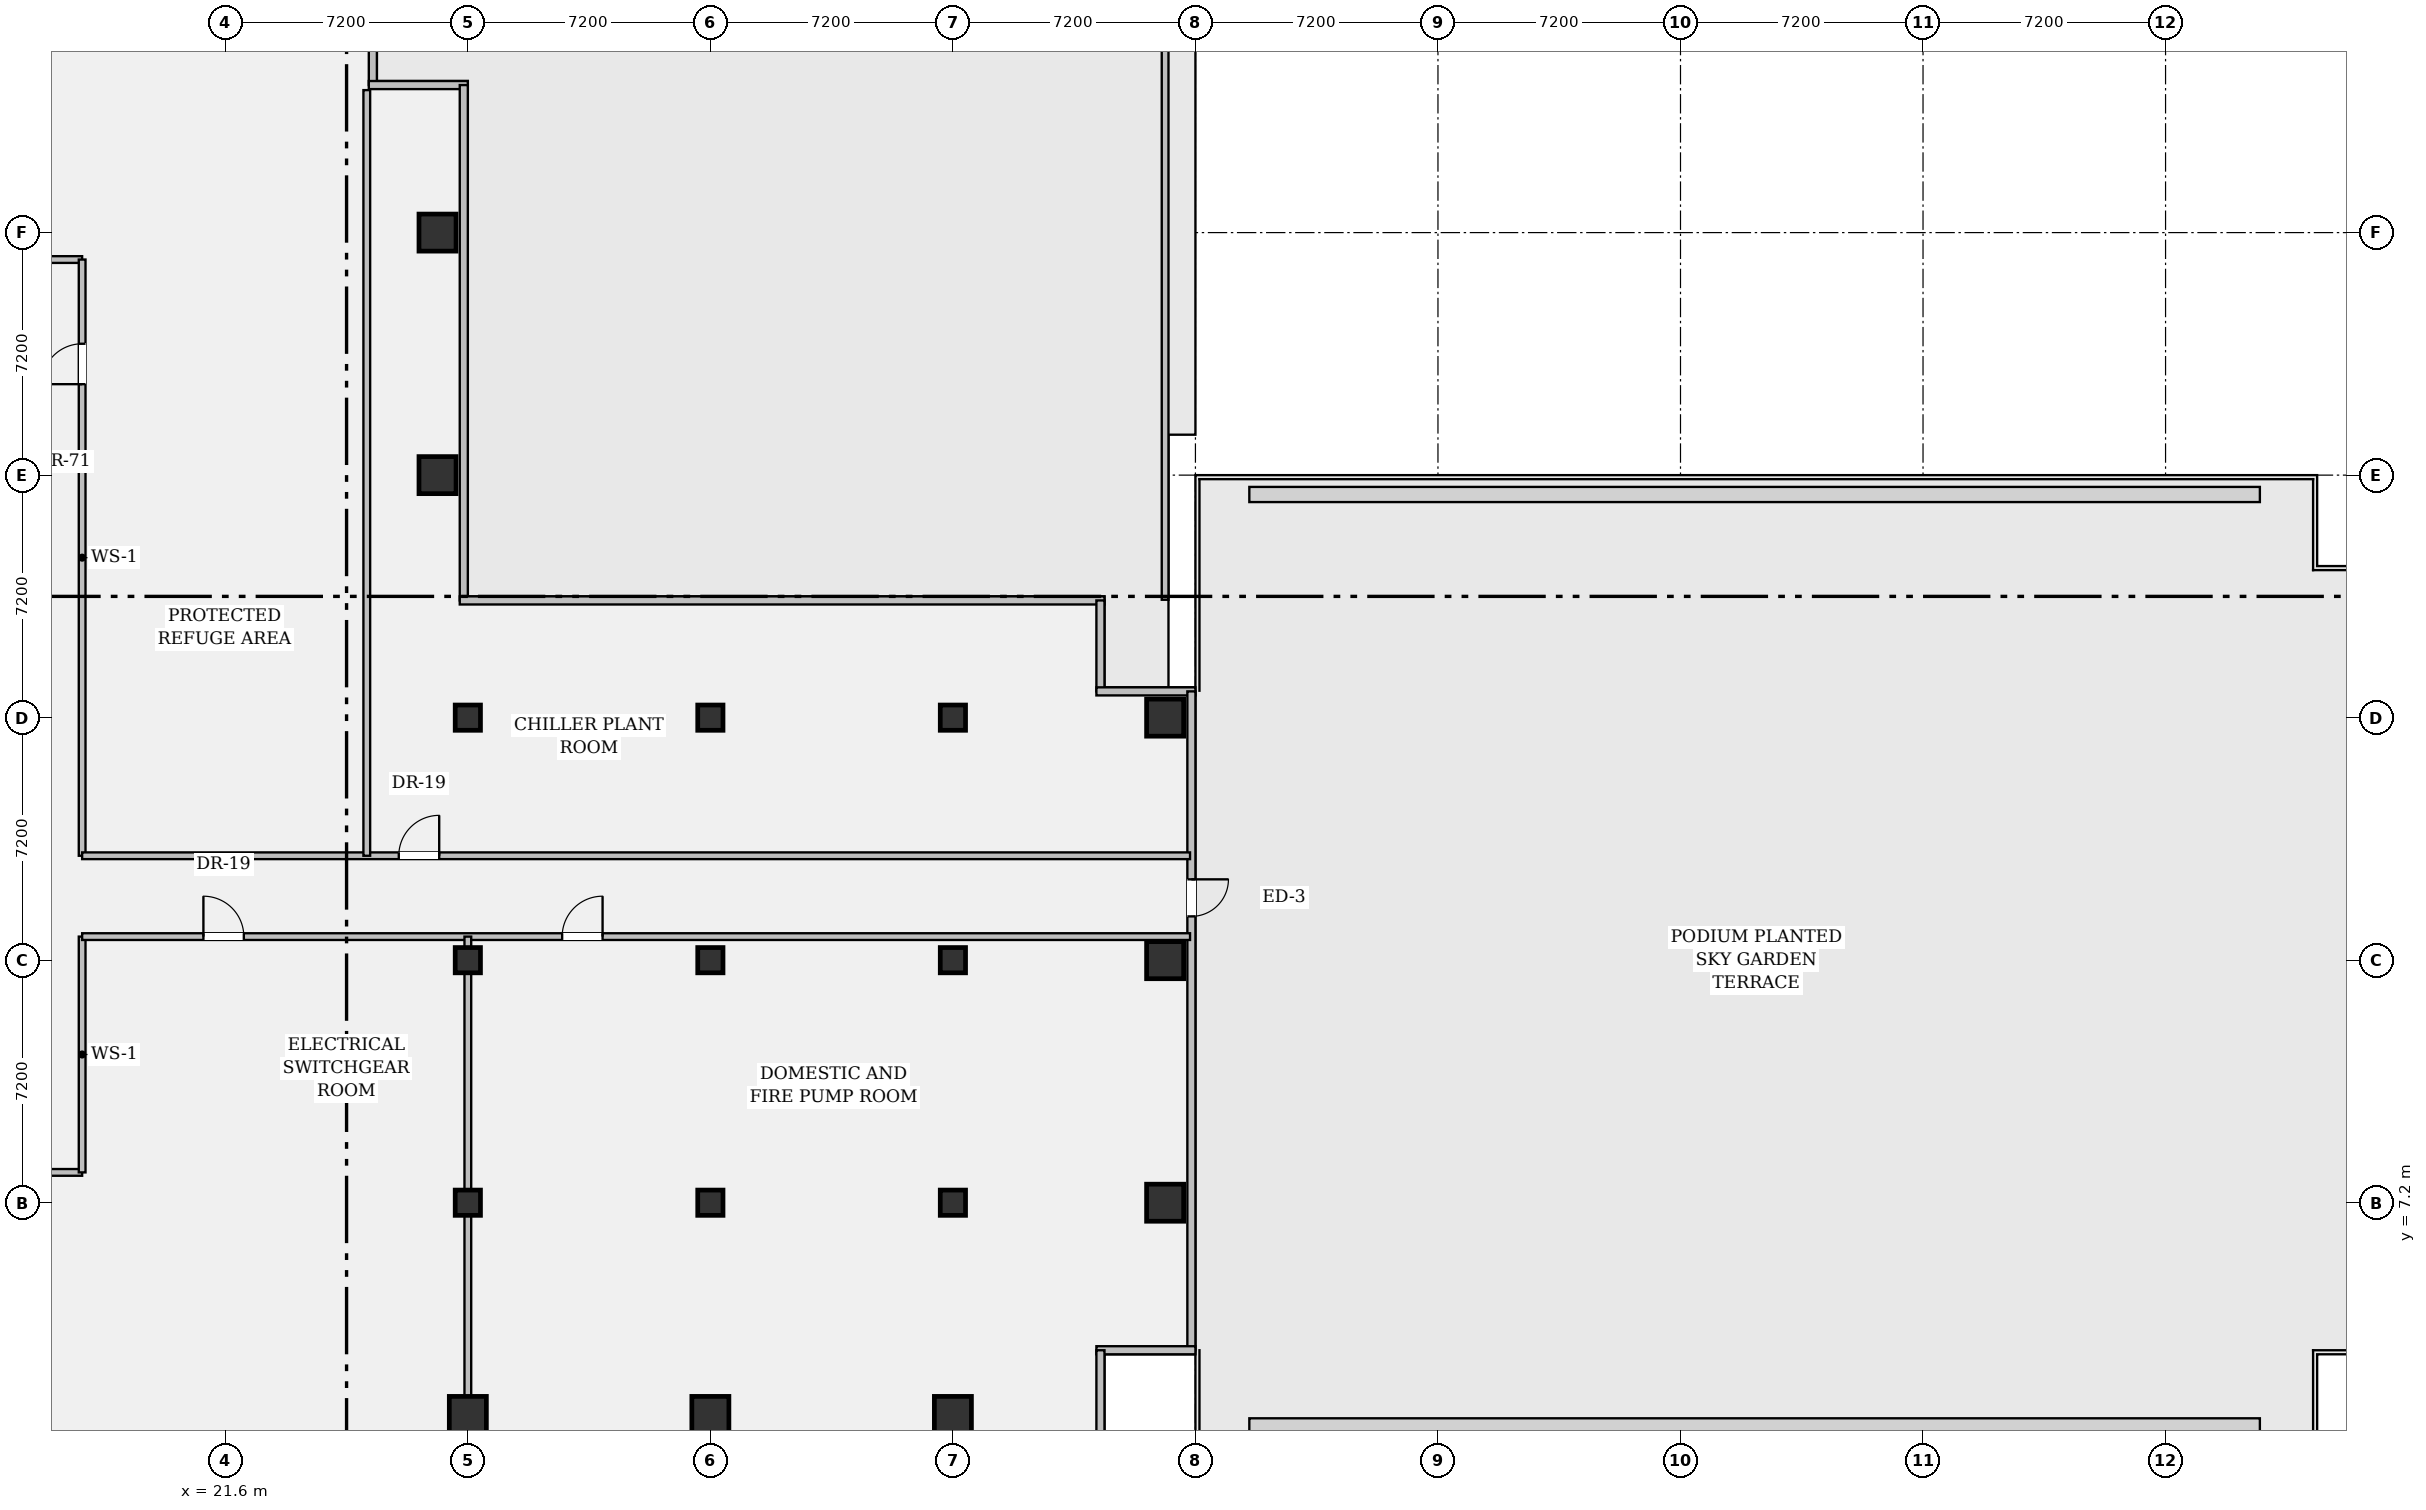
"""IFC4 building model, lengths in metres.
Left out: names, types, materials, properties, quantities, classifications, styles, units other than length and angle.
Written with IfcOpenShell. Run it as: python <this file> out.ifc"""

import sys

from ifc_helpers import new_model, si_unit, direction, frame, frame_2d, origin, origin_2d, place, context, subcontext, project, spatial, rectangle, hollow_rectangle, extrude, element, fill, save


model = new_model("IFC4")
c1 = context("Model", 3, precision=1e-05, world=origin(), true_north=direction((0.0, 1.0)))
c2 = subcontext(c1, "Body", "Model", "MODEL_VIEW")
j1 = project(units=[si_unit("LENGTHUNIT", "METRE"), si_unit("PLANEANGLEUNIT", "RADIAN")], contexts=[c1])
p1 = place(None, origin())
s1 = spatial("IfcSite", under=j1, at=p1, CompositionType="ELEMENT")
p2 = place(p1, origin())
s2 = spatial("IfcBuilding", under=s1, at=p2, CompositionType="ELEMENT")
p3 = place(p2, frame((0.0, 0.0, 26.25)))
s3 = spatial("IfcBuildingStorey", under=s2, at=p3, CompositionType="ELEMENT", Elevation=26.25)
for number, where, z_axis, x_axis in (
    (1, (27.9, 28.8, 0.0), (0.0, 0.0, 1.0), (1.0, 0.0, 0.0)),
    (2, (27.9, 36.0, 0.0), (0.0, 0.0, 1.0), (1.0, 0.0, 0.0)),
    (3, (28.8, 0.9, 0.0), (0.0, 0.0, 1.0), (1.0, 0.0, 0.0)),
):
    element("IfcColumn", number, at=place(p3, frame(where, z_axis=z_axis, x_axis=x_axis)), inside=s3, PredefinedType="COLUMN", context=c2, shape_type="SweptSolid", body=[
        extrude(hollow_rectangle(XDim=1.1, YDim=1.1, WallThickness=0.07, at=origin_2d()), origin(), (0.0, 0.0, 1.0), 4.62),
    ])
for number, where, z_axis, x_axis in (
    (4, (28.8, 7.2, 0.0), (0.0, 0.0, 1.0), (1.0, 0.0, 0.0)),
    (5, (28.8, 14.4, 0.0), (0.0, 0.0, 1.0), (1.0, 0.0, 0.0)),
    (6, (28.8, 21.6, 0.0), (0.0, 0.0, 1.0), (1.0, 0.0, 0.0)),
):
    element("IfcColumn", number, at=place(p3, frame(where, z_axis=z_axis, x_axis=x_axis)), inside=s3, PredefinedType="COLUMN", context=c2, shape_type="SweptSolid", body=[
        extrude(rectangle(XDim=0.75, YDim=0.75, at=origin_2d()), origin(), (0.0, 0.0, 1.0), 4.62),
    ])
p4 = place(p3, frame((36.0, 0.9, 0.0), z_axis=(0.0, 0.0, 1.0), x_axis=(1.0, 0.0, 0.0)))
e7 = element("IfcColumn", 7, at=p4, inside=s3, PredefinedType="COLUMN", context=c2, shape_type="SweptSolid", body=[
    extrude(hollow_rectangle(XDim=1.1, YDim=1.1, WallThickness=0.07, at=origin_2d()), origin(), (0.0, 0.0, 1.0), 4.62),
])
for number, where, z_axis, x_axis in (
    (8, (36.0, 7.2, 0.0), (0.0, 0.0, 1.0), (1.0, 0.0, 0.0)),
    (9, (36.0, 14.4, 0.0), (0.0, 0.0, 1.0), (1.0, 0.0, 0.0)),
    (10, (36.0, 21.6, 0.0), (0.0, 0.0, 1.0), (1.0, 0.0, 0.0)),
):
    element("IfcColumn", number, at=place(p3, frame(where, z_axis=z_axis, x_axis=x_axis)), inside=s3, PredefinedType="COLUMN", context=c2, shape_type="SweptSolid", body=[
        extrude(rectangle(XDim=0.75, YDim=0.75, at=origin_2d()), origin(), (0.0, 0.0, 1.0), 4.62),
    ])
p5 = place(p3, frame((43.2, 0.9, 0.0), z_axis=(0.0, 0.0, 1.0), x_axis=(1.0, 0.0, 0.0)))
e11 = element("IfcColumn", 11, at=p5, inside=s3, PredefinedType="COLUMN", context=c2, shape_type="SweptSolid", body=[
    extrude(hollow_rectangle(XDim=1.1, YDim=1.1, WallThickness=0.07, at=origin_2d()), origin(), (0.0, 0.0, 1.0), 4.62),
])
for number, where, z_axis, x_axis in (
    (12, (43.2, 7.2, 0.0), (0.0, 0.0, 1.0), (1.0, 0.0, 0.0)),
    (13, (43.2, 14.4, 0.0), (0.0, 0.0, 1.0), (1.0, 0.0, 0.0)),
    (14, (43.2, 21.6, 0.0), (0.0, 0.0, 1.0), (1.0, 0.0, 0.0)),
):
    element("IfcColumn", number, at=place(p3, frame(where, z_axis=z_axis, x_axis=x_axis)), inside=s3, PredefinedType="COLUMN", context=c2, shape_type="SweptSolid", body=[
        extrude(rectangle(XDim=0.75, YDim=0.75, at=origin_2d()), origin(), (0.0, 0.0, 1.0), 4.62),
    ])
for number, where, z_axis, x_axis in (
    (15, (49.5, 7.2, 0.0), (0.0, 0.0, 1.0), (1.0, 0.0, 0.0)),
    (16, (49.5, 14.4, 0.0), (0.0, 0.0, 1.0), (1.0, 0.0, 0.0)),
    (17, (49.5, 21.6, 0.0), (0.0, 0.0, 1.0), (1.0, 0.0, 0.0)),
):
    element("IfcColumn", number, at=place(p3, frame(where, z_axis=z_axis, x_axis=x_axis)), inside=s3, PredefinedType="COLUMN", context=c2, shape_type="SweptSolid", body=[
        extrude(hollow_rectangle(XDim=1.1, YDim=1.1, WallThickness=0.07, at=origin_2d()), origin(), (0.0, 0.0, 1.0), 4.62),
    ])
p6 = place(p3, frame((25.98, 43.08, 0.0), z_axis=(0.0, 0.0, 1.0), x_axis=(0.0, -1.0, 0.0)))
e18 = element("IfcWall", 18, at=p6, inside=s3, PredefinedType="STANDARD", context=c2, shape_type="SweptSolid", body=[
    extrude(rectangle(XDim=2.7, YDim=0.24, at=frame_2d((1.35, 0.0))), origin(), (0.0, 0.0, 1.0), 4.62),
])
p7 = place(p3, frame((25.86, 40.38, 0.0), z_axis=(0.0, 0.0, 1.0), x_axis=(1.0, 0.0, 0.0)))
e19 = element("IfcWall", 19, at=p7, inside=s3, PredefinedType="STANDARD", context=c2, shape_type="SweptSolid", body=[
    extrude(rectangle(XDim=2.94, YDim=0.24, at=frame_2d((1.47, 0.0))), origin(), (0.0, 0.0, 1.0), 4.62),
])
p8 = place(p3, frame((28.68, 40.38, 0.0), z_axis=(0.0, 0.0, 1.0), x_axis=(0.0, -1.0, 0.0)))
e20 = element("IfcWall", 20, at=p8, inside=s3, PredefinedType="STANDARD", context=c2, shape_type="SweptSolid", body=[
    extrude(rectangle(XDim=15.3, YDim=0.24, at=frame_2d((7.65, 0.0))), origin(), (0.0, 0.0, 1.0), 4.62),
])
p9 = place(p3, frame((28.56, 25.08, 0.0), z_axis=(0.0, 0.0, 1.0), x_axis=(1.0, 0.0, 0.0)))
e21 = element("IfcWall", 21, at=p9, inside=s3, PredefinedType="STANDARD", context=c2, shape_type="SweptSolid", body=[
    extrude(rectangle(XDim=19.14, YDim=0.24, at=frame_2d((9.57, 0.0))), origin(), (0.0, 0.0, 1.0), 4.62),
])
p10 = place(p3, frame((47.58, 25.08, 0.0), z_axis=(0.0, 0.0, 1.0), x_axis=(0.0, -1.0, 0.0)))
e22 = element("IfcWall", 22, at=p10, inside=s3, PredefinedType="STANDARD", context=c2, shape_type="SweptSolid", body=[
    extrude(rectangle(XDim=2.7, YDim=0.24, at=frame_2d((1.35, 0.0))), origin(), (0.0, 0.0, 1.0), 4.62),
])
p11 = place(p3, frame((47.46, 22.38, 0.0), z_axis=(0.0, 0.0, 1.0), x_axis=(1.0, 0.0, 0.0)))
e23 = element("IfcWall", 23, at=p11, inside=s3, PredefinedType="STANDARD", context=c2, shape_type="SweptSolid", body=[
    extrude(rectangle(XDim=2.94, YDim=0.24, at=frame_2d((1.47, 0.0))), origin(), (0.0, 0.0, 1.0), 4.62),
])
p12 = place(p3, frame((50.28, 22.38, 0.0), z_axis=(0.0, 0.0, 1.0), x_axis=(0.0, -1.0, 0.0)))
e24 = element("IfcWall", 24, at=p12, inside=s3, PredefinedType="STANDARD", context=c2, shape_type="SweptSolid", body=[
    extrude(rectangle(XDim=19.56, YDim=0.24, at=frame_2d((9.78, 0.0))), origin(), (0.0, 0.0, 1.0), 4.62),
])
p13 = place(p12, frame((5.58, 0.0, 0.0)))
e25 = element("IfcOpeningElement", 25, at=p13, cuts=e24, PredefinedType="OPENING", context=c2, shape_type="SweptSolid", body=[
    extrude(rectangle(XDim=1.1, YDim=2.15, at=frame_2d((0.55, 1.075))), frame((0.0, 0.132, 0.0), z_axis=(0.0, -1.0, 0.0), x_axis=(1.0, 0.0, 0.0)), (0.0, 0.0, 1.0), 0.264),
])
p14 = place(p3, frame((50.4, 2.82, 0.0), z_axis=(0.0, 0.0, 1.0), x_axis=(-1.0, 0.0, 0.0)))
e26 = element("IfcWall", 26, at=p14, inside=s3, PredefinedType="STANDARD", context=c2, shape_type="SweptSolid", body=[
    extrude(rectangle(XDim=2.94, YDim=0.24, at=frame_2d((1.47, 0.0))), origin(), (0.0, 0.0, 1.0), 4.62),
])
p15 = place(p3, frame((47.58, 2.82, 0.0), z_axis=(0.0, 0.0, 1.0), x_axis=(0.0, -1.0, 0.0)))
e27 = element("IfcWall", 27, at=p15, inside=s3, PredefinedType="STANDARD", context=c2, shape_type="SweptSolid", body=[
    extrude(rectangle(XDim=2.7, YDim=0.24, at=frame_2d((1.35, 0.0))), origin(), (0.0, 0.0, 1.0), 4.62),
])
p16 = place(p3, frame((49.5, 47.7, 0.0), z_axis=(0.0, 0.0, 1.0), x_axis=(0.0, -1.0, 0.0)))
e28 = element("IfcWall", 28, at=p16, inside=s3, PredefinedType="PARAPET", context=c2, shape_type="SweptSolid", body=[
    extrude(rectangle(XDim=22.6, YDim=0.2, at=frame_2d((11.3, 0.0))), origin(), (0.0, 0.0, 1.0), 1.15),
])
p17 = place(p3, frame((14.4, 8.1, 0.0), z_axis=(0.0, 0.0, 1.0), x_axis=(1.0, 0.0, 0.0)))
e29 = element("IfcWall", 29, at=p17, inside=s3, PredefinedType="PARTITIONING", context=c2, shape_type="SweptSolid", body=[
    extrude(rectangle(XDim=2.95, YDim=0.2, at=frame_2d((1.475, 0.0))), origin(), (0.0, 0.0, 1.0), 3.678),
])
p18 = place(p17, frame((0.9, 0.0, 0.0)))
e30 = element("IfcOpeningElement", 30, at=p18, cuts=e29, PredefinedType="OPENING", context=c2, shape_type="SweptSolid", body=[
    extrude(rectangle(XDim=1.0, YDim=2.15, at=frame_2d((0.5, 1.075))), frame((0.0, 0.112, 0.0), z_axis=(0.0, -1.0, 0.0), x_axis=(1.0, 0.0, 0.0)), (0.0, 0.0, 1.0), 0.224),
])
p19 = place(p3, frame((14.4, 35.2, 0.0), z_axis=(0.0, 0.0, 1.0), x_axis=(1.0, 0.0, 0.0)))
e31 = element("IfcWall", 31, at=p19, inside=s3, PredefinedType="PARTITIONING", context=c2, shape_type="SweptSolid", body=[
    extrude(rectangle(XDim=2.95, YDim=0.2, at=frame_2d((1.475, 0.0))), origin(), (0.0, 0.0, 1.0), 3.678),
])
p20 = place(p19, frame((0.9, 0.0, 0.0)))
e32 = element("IfcOpeningElement", 32, at=p20, cuts=e31, PredefinedType="OPENING", context=c2, shape_type="SweptSolid", body=[
    extrude(rectangle(XDim=1.0, YDim=2.15, at=frame_2d((0.5, 1.075))), frame((0.0, 0.112, 0.0), z_axis=(0.0, -1.0, 0.0), x_axis=(1.0, 0.0, 0.0)), (0.0, 0.0, 1.0), 0.224),
])
p21 = place(p3, frame((17.35, 8.1, 0.0), z_axis=(0.0, 0.0, 1.0), x_axis=(0.0, 1.0, 0.0)))
e33 = element("IfcWall", 33, at=p21, inside=s3, PredefinedType="PARTITIONING", context=c2, shape_type="SweptSolid", body=[
    extrude(rectangle(XDim=7.0, YDim=0.2, at=frame_2d((3.5, 0.0))), origin(), (0.0, 0.0, 1.0), 2.205),
])
p22 = place(p3, frame((17.35, 17.5, 0.0), z_axis=(0.0, 0.0, 1.0), x_axis=(0.0, 1.0, 0.0)))
e34 = element("IfcWall", 34, at=p22, inside=s3, PredefinedType="PARTITIONING", context=c2, shape_type="SweptSolid", body=[
    extrude(rectangle(XDim=17.7, YDim=0.2, at=frame_2d((8.85, 0.0))), origin(), (0.0, 0.0, 1.0), 2.205),
])
p23 = place(p22, frame((14.0, 0.0, 0.0)))
e35 = element("IfcOpeningElement", 35, at=p23, cuts=e34, PredefinedType="OPENING", context=c2, shape_type="SweptSolid", body=[
    extrude(rectangle(XDim=1.2, YDim=2.02, at=frame_2d((0.6, 1.01))), frame((0.0, 0.112, 0.0), z_axis=(0.0, -1.0, 0.0), x_axis=(1.0, 0.0, 0.0)), (0.0, 0.0, 1.0), 0.224),
])
p24 = place(p3, frame((17.35, 15.1, 0.0), z_axis=(0.0, 0.0, 1.0), x_axis=(1.0, 0.0, 0.0)))
e36 = element("IfcWall", 36, at=p24, inside=s3, PredefinedType="PARTITIONING", context=c2, shape_type="SweptSolid", body=[
    extrude(rectangle(XDim=32.89, YDim=0.2, at=frame_2d((16.445, 0.0))), origin(), (0.0, 0.0, 1.0), 3.678),
])
p25 = place(p24, frame((3.6, 0.0, 0.0)))
e37 = element("IfcOpeningElement", 37, at=p25, cuts=e36, PredefinedType="OPENING", context=c2, shape_type="SweptSolid", body=[
    extrude(rectangle(XDim=1.2, YDim=2.15, at=frame_2d((0.6, 1.075))), frame((0.0, 0.112, 0.0), z_axis=(0.0, -1.0, 0.0), x_axis=(1.0, 0.0, 0.0)), (0.0, 0.0, 1.0), 0.224),
])
p26 = place(p24, frame((14.25, 0.0, 0.0)))
e38 = element("IfcOpeningElement", 38, at=p26, cuts=e36, PredefinedType="OPENING", context=c2, shape_type="SweptSolid", body=[
    extrude(rectangle(XDim=1.2, YDim=2.15, at=frame_2d((0.6, 1.075))), frame((0.0, 0.112, 0.0), z_axis=(0.0, -1.0, 0.0), x_axis=(1.0, 0.0, 0.0)), (0.0, 0.0, 1.0), 0.224),
])
p27 = place(p3, frame((17.35, 17.5, 0.0), z_axis=(0.0, 0.0, 1.0), x_axis=(1.0, 0.0, 0.0)))
e39 = element("IfcWall", 39, at=p27, inside=s3, PredefinedType="PARTITIONING", context=c2, shape_type="SweptSolid", body=[
    extrude(rectangle(XDim=32.89, YDim=0.2, at=frame_2d((16.445, 0.0))), origin(), (0.0, 0.0, 1.0), 3.678),
])
p28 = place(p27, frame((9.4, 0.0, 0.0)))
e40 = element("IfcOpeningElement", 40, at=p28, cuts=e39, PredefinedType="OPENING", context=c2, shape_type="SweptSolid", body=[
    extrude(rectangle(XDim=1.2, YDim=2.15, at=frame_2d((0.6, 1.075))), frame((0.0, 0.112, 0.0), z_axis=(0.0, -1.0, 0.0), x_axis=(1.0, 0.0, 0.0)), (0.0, 0.0, 1.0), 0.224),
])
p29 = place(p3, frame((28.8, 0.12, 0.0), z_axis=(0.0, 0.0, 1.0), x_axis=(0.0, 1.0, 0.0)))
e41 = element("IfcWall", 41, at=p29, inside=s3, PredefinedType="PARTITIONING", context=c2, shape_type="SweptSolid", body=[
    extrude(rectangle(XDim=14.98, YDim=0.2, at=frame_2d((7.49, 0.0))), origin(), (0.0, 0.0, 1.0), 3.678),
])
p30 = place(p3, frame((25.8, 17.5, 0.0), z_axis=(0.0, 0.0, 1.0), x_axis=(0.0, 1.0, 0.0)))
e42 = element("IfcWall", 42, at=p30, inside=s3, PredefinedType="PARTITIONING", context=c2, shape_type="SweptSolid", body=[
    extrude(rectangle(XDim=22.73, YDim=0.2, at=frame_2d((11.365, 0.0))), origin(), (0.0, 0.0, 1.0), 2.205),
])
p31 = place(p13, origin())
e43 = element("IfcDoor", 43, at=p31, inside=s3, OperationType="SINGLE_SWING_LEFT", PredefinedType="DOOR", context=c2, shape_type="SweptSolid", body=[
    extrude(rectangle(XDim=1.1, YDim=2.15, at=frame_2d((0.55, 1.075))), frame((0.0, 0.025, 0.0), z_axis=(0.0, -1.0, 0.0), x_axis=(1.0, 0.0, 0.0)), (0.0, 0.0, 1.0), 0.05),
])
fill(e25, e43)
p32 = place(p23, origin())
e44 = element("IfcDoor", 44, at=p32, inside=s3, OperationType="SINGLE_SWING_LEFT", PredefinedType="DOOR", context=c2, shape_type="SweptSolid", body=[
    extrude(rectangle(XDim=1.2, YDim=2.02, at=frame_2d((0.6, 1.01))), frame((0.0, 0.025, 0.0), z_axis=(0.0, -1.0, 0.0), x_axis=(1.0, 0.0, 0.0)), (0.0, 0.0, 1.0), 0.05),
])
fill(e35, e44)
p33 = place(p28, origin())
e45 = element("IfcDoor", 45, at=p33, inside=s3, OperationType="SINGLE_SWING_RIGHT", PredefinedType="DOOR", context=c2, shape_type="SweptSolid", body=[
    extrude(rectangle(XDim=1.2, YDim=2.15, at=frame_2d((0.6, 1.075))), frame((0.0, 0.025, 0.0), z_axis=(0.0, -1.0, 0.0), x_axis=(1.0, 0.0, 0.0)), (0.0, 0.0, 1.0), 0.05),
])
fill(e40, e45)
p34 = place(p25, origin())
e46 = element("IfcDoor", 46, at=p34, inside=s3, OperationType="SINGLE_SWING_LEFT", PredefinedType="DOOR", context=c2, shape_type="SweptSolid", body=[
    extrude(rectangle(XDim=1.2, YDim=2.15, at=frame_2d((0.6, 1.075))), frame((0.0, 0.025, 0.0), z_axis=(0.0, -1.0, 0.0), x_axis=(1.0, 0.0, 0.0)), (0.0, 0.0, 1.0), 0.05),
])
fill(e37, e46)
p35 = place(p26, origin())
e47 = element("IfcDoor", 47, at=p35, inside=s3, OperationType="SINGLE_SWING_RIGHT", PredefinedType="DOOR", context=c2, shape_type="SweptSolid", body=[
    extrude(rectangle(XDim=1.2, YDim=2.15, at=frame_2d((0.6, 1.075))), frame((0.0, 0.025, 0.0), z_axis=(0.0, -1.0, 0.0), x_axis=(1.0, 0.0, 0.0)), (0.0, 0.0, 1.0), 0.05),
])
fill(e38, e47)
save(model, sys.argv[1])
